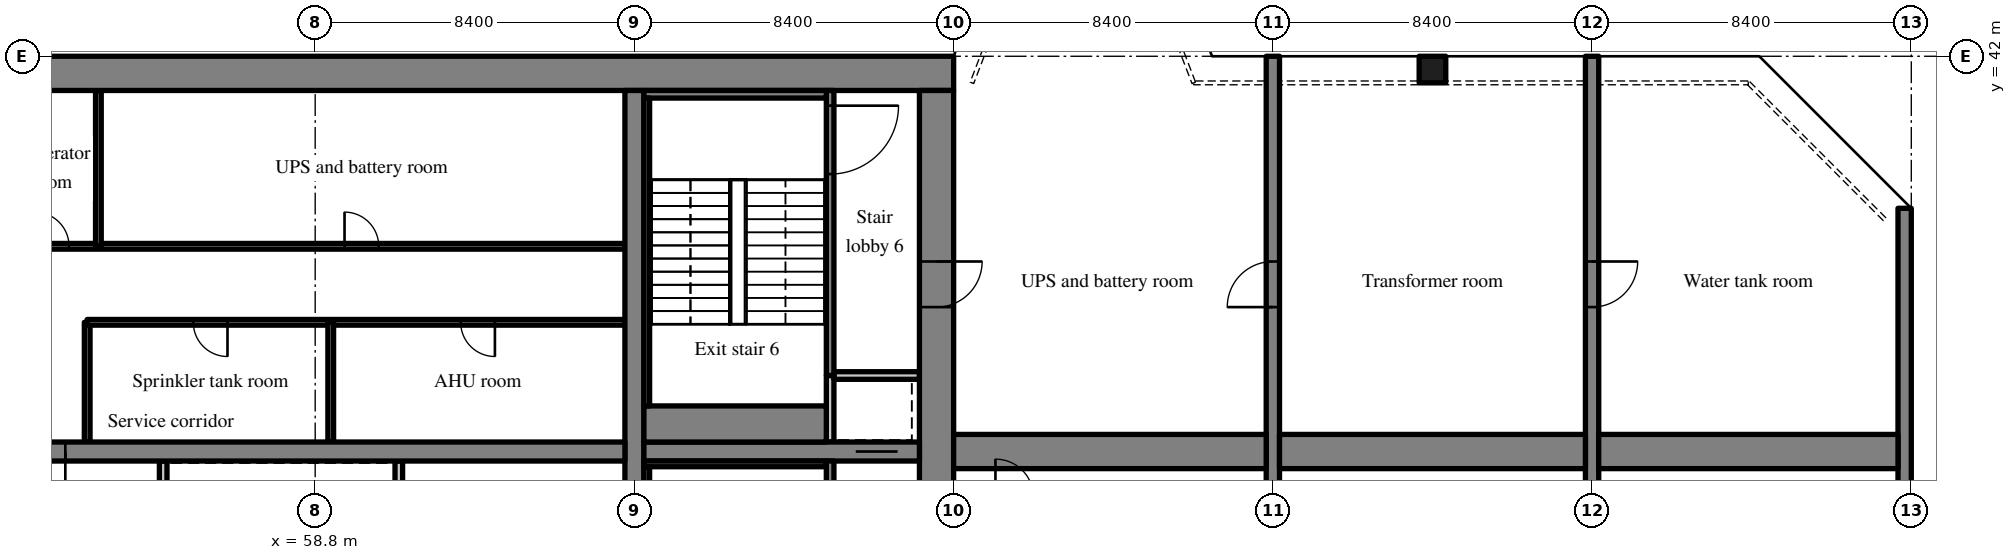
"""IFC4 building model, lengths in metres.
Left out: names, types, materials, properties, quantities, classifications, styles, units other than length and angle.
Written with IfcOpenShell. Run it as: python <this file> out.ifc"""

import sys

from ifc_helpers import new_model, si_unit, direction, frame, frame_2d, origin, origin_2d, place, context, subcontext, project, spatial, rectangle, extrude, source, transform, mapped, element, fill, save


model = new_model("IFC4")
c1 = context("Model", 3, precision=1e-05, world=origin(), true_north=direction((0.0, 1.0)))
c2 = subcontext(c1, "Body", "Model", "MODEL_VIEW")
j1 = project(units=[si_unit("LENGTHUNIT", "METRE"), si_unit("PLANEANGLEUNIT", "RADIAN")], contexts=[c1])
p1 = place(None, origin())
s1 = spatial("IfcSite", under=j1, at=p1, CompositionType="ELEMENT")
p2 = place(p1, origin())
s2 = spatial("IfcBuilding", under=s1, at=p2, CompositionType="ELEMENT")
p3 = place(p2, frame((0.0, 0.0, 140.8)))
s3 = spatial("IfcBuildingStorey", under=s2, at=p3, CompositionType="ELEMENT", Elevation=140.8)
m1 = source(origin(), c2, "Body", "SweptSolid", [
    extrude(rectangle(XDim=50.4, YDim=0.9, at=frame_2d((25.2, 0.0))), origin(), (0.0, 0.0, 1.0), 5.12),
])
p4 = place(p3, frame((25.2, 41.55, 0.0), z_axis=(0.0, 0.0, 1.0), x_axis=(1.0, 0.0, 0.0)))
e1 = element("IfcWall", 1, at=p4, inside=s3, PredefinedType="SHEAR", context=c2, shape_type="MappedRepresentation", body=[
    mapped(m1, transform((0.0, 0.0, 0.0), scale=1.0)),
])
m2 = source(origin(), c2, "Body", "SweptSolid", [
    extrude(rectangle(XDim=18.2, YDim=0.9, at=frame_2d((9.1, 0.0))), origin(), (0.0, 0.0, 1.0), 5.12),
])
p5 = place(p3, frame((75.15, 22.9, 0.0), z_axis=(0.0, 0.0, 1.0), x_axis=(0.0, 1.0, 0.0)))
e2 = element("IfcWall", 2, at=p5, inside=s3, PredefinedType="SHEAR", context=c2, shape_type="MappedRepresentation", body=[
    mapped(m2, transform((0.0, 0.0, 0.0), scale=1.0)),
])
m3 = source(origin(), c2, "Body", "SweptSolid", [
    extrude(rectangle(XDim=1.0, YDim=2.1, at=frame_2d((0.5, 1.05))), frame((0.0, 0.46, 0.0), z_axis=(0.0, -1.0, 0.0), x_axis=(1.0, 0.0, 0.0)), (0.0, 0.0, 1.0), 0.92),
])
p6 = place(p5, frame((2.6, 0.0, 0.0)))
e3 = element("IfcOpeningElement", 3, at=p6, cuts=e2, PredefinedType="OPENING", context=c2, shape_type="MappedRepresentation", body=[
    mapped(m3, transform((0.0, 0.0, 0.0), scale=1.0)),
])
m4 = source(origin(), c2, "Body", "SweptSolid", [
    extrude(rectangle(XDim=1.2, YDim=2.1, at=frame_2d((0.6, 1.05))), frame((0.0, 0.46, 0.0), z_axis=(0.0, -1.0, 0.0), x_axis=(1.0, 0.0, 0.0)), (0.0, 0.0, 1.0), 0.92),
])
p7 = place(p5, frame((12.5, 0.0, 0.0)))
e4 = element("IfcOpeningElement", 4, at=p7, cuts=e2, PredefinedType="OPENING", context=c2, shape_type="MappedRepresentation", body=[
    mapped(m4, transform((0.0, 0.0, 0.0), scale=1.0)),
])
m5 = source(origin(), c2, "Body", "SweptSolid", [
    extrude(rectangle(XDim=18.2, YDim=0.5, at=frame_2d((9.1, 0.0))), origin(), (0.0, 0.0, 1.0), 5.12),
])
p8 = place(p3, frame((67.2, 22.9, 0.0), z_axis=(0.0, 0.0, 1.0), x_axis=(0.0, 1.0, 0.0)))
e5 = element("IfcWall", 5, at=p8, inside=s3, PredefinedType="SHEAR", context=c2, shape_type="MappedRepresentation", body=[
    mapped(m5, transform((0.0, 0.0, 0.0), scale=1.0)),
])
m6 = source(origin(), c2, "Body", "SweptSolid", [
    extrude(rectangle(XDim=16.3, YDim=0.5, at=frame_2d((8.15, 0.0))), origin(), (0.0, 0.0, 1.0), 5.12),
])
p9 = place(p3, frame((50.65, 31.6, 0.0), z_axis=(0.0, 0.0, 1.0), x_axis=(1.0, 0.0, 0.0)))
e6 = element("IfcWall", 6, at=p9, inside=s3, PredefinedType="SHEAR", context=c2, shape_type="MappedRepresentation", body=[
    mapped(m6, transform((0.0, 0.0, 0.0), scale=1.0)),
])
m7 = source(origin(), c2, "Body", "SweptSolid", [
    extrude(rectangle(XDim=1.0, YDim=2.1, at=frame_2d((0.5, 1.05))), frame((0.0, 0.26, 0.0), z_axis=(0.0, -1.0, 0.0), x_axis=(1.0, 0.0, 0.0)), (0.0, 0.0, 1.0), 0.52),
])
p10 = place(p9, frame((0.575, 0.0, 0.0)))
e7 = element("IfcOpeningElement", 7, at=p10, cuts=e6, PredefinedType="OPENING", context=c2, shape_type="MappedRepresentation", body=[
    mapped(m7, transform((0.0, 0.0, 0.0), scale=1.0)),
])
m8 = source(origin(), c2, "Body", "SweptSolid", [
    extrude(rectangle(XDim=7.25, YDim=0.5, at=frame_2d((3.625, 0.0))), origin(), (0.0, 0.0, 1.0), 5.12),
])
p11 = place(p3, frame((67.45, 31.6, 0.0), z_axis=(0.0, 0.0, 1.0), x_axis=(1.0, 0.0, 0.0)))
e8 = element("IfcWall", 8, at=p11, inside=s3, PredefinedType="SHEAR", context=c2, shape_type="MappedRepresentation", body=[
    mapped(m8, transform((0.0, 0.0, 0.0), scale=1.0)),
])
m9 = source(origin(), c2, "Body", "SweptSolid", [
    extrude(rectangle(XDim=1.1, YDim=2.1, at=frame_2d((0.55, 1.05))), frame((0.0, 0.26, 0.0), z_axis=(0.0, -1.0, 0.0), x_axis=(1.0, 0.0, 0.0)), (0.0, 0.0, 1.0), 0.52),
])
p12 = place(p11, frame((5.575, 0.0, 0.0)))
e9 = element("IfcOpeningElement", 9, at=p12, cuts=e8, PredefinedType="OPENING", context=c2, shape_type="MappedRepresentation", body=[
    mapped(m9, transform((0.0, 0.0, 0.0), scale=1.0)),
])
m10 = source(origin(), c2, "Body", "SweptSolid", [
    extrude(rectangle(XDim=20.0, YDim=0.35, at=frame_2d((10.0, 0.0))), origin(), (0.0, 0.0, 1.0), 5.12),
])
p13 = place(p3, frame((84.0, 22.0, 0.0), z_axis=(0.0, 0.0, 1.0), x_axis=(0.0, 1.0, 0.0)))
e10 = element("IfcWall", 10, at=p13, inside=s3, PredefinedType="SHEAR", context=c2, shape_type="MappedRepresentation", body=[
    mapped(m10, transform((0.0, 0.0, 0.0), scale=1.0)),
])
m11 = source(origin(), c2, "Body", "SweptSolid", [
    extrude(rectangle(XDim=1.2, YDim=2.1, at=frame_2d((0.6, 1.05))), frame((0.0, 0.185, 0.0), z_axis=(0.0, -1.0, 0.0), x_axis=(1.0, 0.0, 0.0)), (0.0, 0.0, 1.0), 0.37),
])
p14 = place(p13, frame((13.4, 0.0, 0.0)))
e11 = element("IfcOpeningElement", 11, at=p14, cuts=e10, PredefinedType="OPENING", context=c2, shape_type="MappedRepresentation", body=[
    mapped(m11, transform((0.0, 0.0, 0.0), scale=1.0)),
])
p15 = place(p3, frame((92.4, 22.0, 0.0), z_axis=(0.0, 0.0, 1.0), x_axis=(0.0, 1.0, 0.0)))
e12 = element("IfcWall", 12, at=p15, inside=s3, PredefinedType="SHEAR", context=c2, shape_type="MappedRepresentation", body=[
    mapped(m10, transform((0.0, 0.0, 0.0), scale=1.0)),
])
p16 = place(p15, frame((13.4, 0.0, 0.0)))
e13 = element("IfcOpeningElement", 13, at=p16, cuts=e12, PredefinedType="OPENING", context=c2, shape_type="MappedRepresentation", body=[
    mapped(m11, transform((0.0, 0.0, 0.0), scale=1.0)),
])
m12 = source(origin(), c2, "Body", "SweptSolid", [
    extrude(rectangle(XDim=16.0, YDim=0.35, at=frame_2d((8.0, 0.0))), origin(), (0.0, 0.0, 1.0), 5.12),
])
p17 = place(p3, frame((100.625, 22.0, 0.0), z_axis=(0.0, 0.0, 1.0), x_axis=(0.0, 1.0, 0.0)))
e14 = element("IfcWall", 14, at=p17, inside=s3, PredefinedType="SHEAR", context=c2, shape_type="MappedRepresentation", body=[
    mapped(m12, transform((0.0, 0.0, 0.0), scale=1.0)),
])
m13 = source(origin(), c2, "Body", "SweptSolid", [
    extrude(rectangle(XDim=0.7, YDim=0.7, at=origin_2d()), origin(), (0.0, 0.0, 1.0), 5.12),
])
p18 = place(p3, frame((88.2, 41.65, 0.0), z_axis=(0.0, 0.0, 1.0), x_axis=(1.0, 0.0, 0.0)))
e15 = element("IfcColumn", 15, at=p18, inside=s3, PredefinedType="COLUMN", context=c2, shape_type="MappedRepresentation", body=[
    mapped(m13, transform((0.0, 0.0, 0.0), scale=1.0)),
])
m14 = source(origin(), c2, "Body", "SweptSolid", [
    extrude(rectangle(XDim=8.225, YDim=0.9, at=frame_2d((4.112, 0.0))), origin(), (0.0, 0.0, 1.0), 5.12),
])
p19 = place(p3, frame((75.6, 31.6, 0.0), z_axis=(0.0, 0.0, 1.0), x_axis=(1.0, 0.0, 0.0)))
e16 = element("IfcWall", 16, at=p19, inside=s3, PredefinedType="SHEAR", context=c2, shape_type="MappedRepresentation", body=[
    mapped(m14, transform((0.0, 0.0, 0.0), scale=1.0)),
])
m15 = source(origin(), c2, "Body", "SweptSolid", [
    extrude(rectangle(XDim=8.05, YDim=0.9, at=frame_2d((4.025, 0.0))), origin(), (0.0, 0.0, 1.0), 5.12),
])
p20 = place(p3, frame((84.175, 31.6, 0.0), z_axis=(0.0, 0.0, 1.0), x_axis=(1.0, 0.0, 0.0)))
e17 = element("IfcWall", 17, at=p20, inside=s3, PredefinedType="SHEAR", context=c2, shape_type="MappedRepresentation", body=[
    mapped(m15, transform((0.0, 0.0, 0.0), scale=1.0)),
])
m16 = source(origin(), c2, "Body", "SweptSolid", [
    extrude(rectangle(XDim=7.875, YDim=0.9, at=frame_2d((3.938, 0.0))), origin(), (0.0, 0.0, 1.0), 5.12),
])
p21 = place(p3, frame((92.575, 31.6, 0.0), z_axis=(0.0, 0.0, 1.0), x_axis=(1.0, 0.0, 0.0)))
e18 = element("IfcWall", 18, at=p21, inside=s3, PredefinedType="SHEAR", context=c2, shape_type="MappedRepresentation", body=[
    mapped(m16, transform((0.0, 0.0, 0.0), scale=1.0)),
])
m17 = source(origin(), c2, "Body", "SweptSolid", [
    extrude(rectangle(XDim=2.55, YDim=0.2, at=frame_2d((1.275, 0.0))), origin(), (0.0, 0.0, 1.0), 5.12),
])
for number, where, z_axis, x_axis in (
    (19, (54.8, 28.8, 0.0), (0.0, 0.0, 1.0), (0.0, 1.0, 0.0)),
    (20, (61.0, 28.8, 0.0), (0.0, 0.0, 1.0), (0.0, 1.0, 0.0)),
):
    element("IfcWall", number, at=place(p3, frame(where, z_axis=z_axis, x_axis=x_axis)), inside=s3, PredefinedType="SOLIDWALL", context=c2, shape_type="MappedRepresentation", body=[
        mapped(m17, transform((0.0, 0.0, 0.0), scale=1.0)),
    ])
m18 = source(origin(), c2, "Body", "SweptSolid", [
    extrude(rectangle(XDim=3.15, YDim=0.15, at=frame_2d((1.575, 0.0))), origin(), (0.0, 0.0, 1.0), 5.12),
])
p22 = place(p3, frame((52.8, 31.85, 0.0), z_axis=(0.0, 0.0, 1.0), x_axis=(0.0, 1.0, 0.0)))
e21 = element("IfcWall", 21, at=p22, inside=s3, PredefinedType="PARTITIONING", context=c2, shape_type="MappedRepresentation", body=[
    mapped(m18, transform((0.0, 0.0, 0.0), scale=1.0)),
])
m19 = source(origin(), c2, "Body", "SweptSolid", [
    extrude(rectangle(XDim=14.15, YDim=0.15, at=frame_2d((7.075, 0.0))), origin(), (0.0, 0.0, 1.0), 5.12),
])
p23 = place(p3, frame((66.95, 35.0, 0.0), z_axis=(0.0, 0.0, 1.0), x_axis=(-1.0, 0.0, 0.0)))
e22 = element("IfcWall", 22, at=p23, inside=s3, PredefinedType="PARTITIONING", context=c2, shape_type="MappedRepresentation", body=[
    mapped(m19, transform((0.0, 0.0, 0.0), scale=1.0)),
])
m20 = source(origin(), c2, "Body", "SweptSolid", [
    extrude(rectangle(XDim=0.9, YDim=2.1, at=frame_2d((0.45, 1.05))), frame((0.0, 0.085, 0.0), z_axis=(0.0, -1.0, 0.0), x_axis=(1.0, 0.0, 0.0)), (0.0, 0.0, 1.0), 0.17),
])
p24 = place(p23, frame((3.421, 0.0, 0.0)))
e23 = element("IfcOpeningElement", 23, at=p24, cuts=e22, PredefinedType="OPENING", context=c2, shape_type="MappedRepresentation", body=[
    mapped(m20, transform((0.0, 0.0, 0.0), scale=1.0)),
])
p25 = place(p23, frame((10.458, 0.0, 0.0)))
e24 = element("IfcOpeningElement", 24, at=p25, cuts=e22, PredefinedType="OPENING", context=c2, shape_type="MappedRepresentation", body=[
    mapped(m20, transform((0.0, 0.0, 0.0), scale=1.0)),
])
m21 = source(origin(), c2, "Body", "SweptSolid", [
    extrude(rectangle(XDim=16.3, YDim=0.15, at=frame_2d((8.15, 0.0))), origin(), (0.0, 0.0, 1.0), 5.12),
])
p26 = place(p3, frame((66.95, 37.0, 0.0), z_axis=(0.0, 0.0, 1.0), x_axis=(-1.0, 0.0, 0.0)))
e25 = element("IfcWall", 25, at=p26, inside=s3, PredefinedType="PARTITIONING", context=c2, shape_type="MappedRepresentation", body=[
    mapped(m21, transform((0.0, 0.0, 0.0), scale=1.0)),
])
p27 = place(p26, frame((6.478, 0.0, 0.0)))
e26 = element("IfcOpeningElement", 26, at=p27, cuts=e25, PredefinedType="OPENING", context=c2, shape_type="MappedRepresentation", body=[
    mapped(m20, transform((0.0, 0.0, 0.0), scale=1.0)),
])
p28 = place(p26, frame((14.627, 0.0, 0.0)))
e27 = element("IfcOpeningElement", 27, at=p28, cuts=e25, PredefinedType="OPENING", context=c2, shape_type="MappedRepresentation", body=[
    mapped(m20, transform((0.0, 0.0, 0.0), scale=1.0)),
])
p29 = place(p3, frame((59.209, 31.85, 0.0), z_axis=(0.0, 0.0, 1.0), x_axis=(0.0, 1.0, 0.0)))
e28 = element("IfcWall", 28, at=p29, inside=s3, PredefinedType="PARTITIONING", context=c2, shape_type="MappedRepresentation", body=[
    mapped(m18, transform((0.0, 0.0, 0.0), scale=1.0)),
])
m22 = source(origin(), c2, "Body", "SweptSolid", [
    extrude(rectangle(XDim=4.1, YDim=0.15, at=frame_2d((2.05, 0.0))), origin(), (0.0, 0.0, 1.0), 5.12),
])
p30 = place(p3, frame((53.095, 37.0, 0.0), z_axis=(0.0, 0.0, 1.0), x_axis=(0.0, 1.0, 0.0)))
e29 = element("IfcWall", 29, at=p30, inside=s3, PredefinedType="PARTITIONING", context=c2, shape_type="MappedRepresentation", body=[
    mapped(m22, transform((0.0, 0.0, 0.0), scale=1.0)),
])
m23 = source(origin(), c2, "Body", "SweptSolid", [
    extrude(rectangle(XDim=8.45, YDim=0.2, at=frame_2d((4.225, 0.0))), origin(), (0.0, 0.0, 1.0), 5.12),
])
p31 = place(p3, frame((72.35, 22.9, 0.0), z_axis=(0.0, 0.0, 1.0), x_axis=(0.0, 1.0, 0.0)))
e30 = element("IfcWall", 30, at=p31, inside=s3, PredefinedType="SOLIDWALL", context=c2, shape_type="MappedRepresentation", body=[
    mapped(m23, transform((0.0, 0.0, 0.0), scale=1.0)),
])
m24 = source(origin(), c2, "Body", "SweptSolid", [
    extrude(rectangle(XDim=1.2, YDim=2.1, at=frame_2d((0.6, 1.05))), frame((0.0, 0.11, 0.0), z_axis=(0.0, -1.0, 0.0), x_axis=(1.0, 0.0, 0.0)), (0.0, 0.0, 1.0), 0.22),
])
p32 = place(p31, frame((6.6, 0.0, 0.0)))
e31 = element("IfcOpeningElement", 31, at=p32, cuts=e30, PredefinedType="OPENING", context=c2, shape_type="MappedRepresentation", body=[
    mapped(m24, transform((0.0, 0.0, 0.0), scale=1.0)),
])
m25 = source(origin(), c2, "Body", "SweptSolid", [
    extrude(rectangle(XDim=1.75, YDim=0.2, at=frame_2d((0.875, 0.0))), origin(), (0.0, 0.0, 1.0), 5.12),
])
p33 = place(p3, frame((72.35, 31.85, 0.0), z_axis=(0.0, 0.0, 1.0), x_axis=(0.0, 1.0, 0.0)))
e32 = element("IfcWall", 32, at=p33, inside=s3, PredefinedType="SOLIDWALL", context=c2, shape_type="MappedRepresentation", body=[
    mapped(m25, transform((0.0, 0.0, 0.0), scale=1.0)),
])
m26 = source(origin(), c2, "Body", "SweptSolid", [
    extrude(rectangle(XDim=2.25, YDim=0.2, at=frame_2d((1.125, 0.0))), origin(), (0.0, 0.0, 1.0), 5.12),
])
p34 = place(p3, frame((72.45, 33.6, 0.0), z_axis=(0.0, 0.0, 1.0), x_axis=(1.0, 0.0, 0.0)))
e33 = element("IfcWall", 33, at=p34, inside=s3, PredefinedType="SOLIDWALL", context=c2, shape_type="MappedRepresentation", body=[
    mapped(m26, transform((0.0, 0.0, 0.0), scale=1.0)),
])
m27 = source(origin(), c2, "Body", "SweptSolid", [
    extrude(rectangle(XDim=7.5, YDim=0.2, at=frame_2d((3.75, 0.0))), origin(), (0.0, 0.0, 1.0), 5.12),
])
p35 = place(p3, frame((72.35, 33.6, 0.0), z_axis=(0.0, 0.0, 1.0), x_axis=(0.0, 1.0, 0.0)))
e34 = element("IfcWall", 34, at=p35, inside=s3, PredefinedType="SOLIDWALL", context=c2, shape_type="MappedRepresentation", body=[
    mapped(m27, transform((0.0, 0.0, 0.0), scale=1.0)),
])
m28 = source(origin(), c2, "Body", "SweptSolid", [
    extrude(rectangle(XDim=1.8, YDim=2.1, at=frame_2d((0.9, 1.05))), frame((0.0, 0.11, 0.0), z_axis=(0.0, -1.0, 0.0), x_axis=(1.0, 0.0, 0.0)), (0.0, 0.0, 1.0), 0.22),
])
p36 = place(p35, frame((5.3, 0.0, 0.0)))
e35 = element("IfcOpeningElement", 35, at=p36, cuts=e34, PredefinedType="OPENING", context=c2, shape_type="MappedRepresentation", body=[
    mapped(m28, transform((0.0, 0.0, 0.0), scale=1.0)),
])
m29 = source(origin(), c2, "Body", "SweptSolid", [
    extrude(rectangle(XDim=4.8, YDim=0.15, at=frame_2d((2.4, 0.0))), origin(), (0.0, 0.0, 1.0), 5.12),
])
p37 = place(p3, frame((67.45, 31.275, 0.0), z_axis=(0.0, 0.0, 1.0), x_axis=(1.0, 0.0, 0.0)))
e36 = element("IfcWall", 36, at=p37, inside=s3, PredefinedType="SOLIDWALL", context=c2, shape_type="MappedRepresentation", body=[
    mapped(m29, transform((0.0, 0.0, 0.0), scale=1.0)),
])
m30 = source(origin(), c2, "Body", "SweptSolid", [
    extrude(rectangle(XDim=8.1, YDim=0.15, at=frame_2d((4.05, 0.0))), origin(), (0.0, 0.0, 1.0), 5.12),
])
p38 = place(p3, frame((67.525, 23.1, 0.0), z_axis=(0.0, 0.0, 1.0), x_axis=(0.0, 1.0, 0.0)))
e37 = element("IfcWall", 37, at=p38, inside=s3, PredefinedType="SOLIDWALL", context=c2, shape_type="MappedRepresentation", body=[
    mapped(m30, transform((0.0, 0.0, 0.0), scale=1.0)),
])
m31 = source(origin(), c2, "Body", "SweptSolid", [
    extrude(rectangle(XDim=4.8, YDim=0.2, at=frame_2d((2.4, 0.0))), origin(), (0.0, 0.0, 1.0), 5.12),
])
p39 = place(p3, frame((67.45, 41.0, 0.0), z_axis=(0.0, 0.0, 1.0), x_axis=(1.0, 0.0, 0.0)))
e38 = element("IfcWall", 38, at=p39, inside=s3, PredefinedType="SOLIDWALL", context=c2, shape_type="MappedRepresentation", body=[
    mapped(m31, transform((0.0, 0.0, 0.0), scale=1.0)),
])
m32 = source(origin(), c2, "Body", "SweptSolid", [
    extrude(rectangle(XDim=4.8, YDim=0.95, at=frame_2d((2.4, 0.0))), origin(), (0.0, 0.0, 1.0), 5.12),
])
p40 = place(p3, frame((67.45, 32.325, 0.0), z_axis=(0.0, 0.0, 1.0), x_axis=(1.0, 0.0, 0.0)))
e39 = element("IfcWall", 39, at=p40, inside=s3, PredefinedType="SOLIDWALL", context=c2, shape_type="MappedRepresentation", body=[
    mapped(m32, transform((0.0, 0.0, 0.0), scale=1.0)),
])
p41 = place(p3, frame((67.525, 32.8, 0.0), z_axis=(0.0, 0.0, 1.0), x_axis=(0.0, 1.0, 0.0)))
e40 = element("IfcWall", 40, at=p41, inside=s3, PredefinedType="SOLIDWALL", context=c2, shape_type="MappedRepresentation", body=[
    mapped(m30, transform((0.0, 0.0, 0.0), scale=1.0)),
])
m33 = source(origin(), c2, "Body", "SweptSolid", [
    extrude(rectangle(XDim=1.0, YDim=2.1, at=frame_2d((0.5, 1.05))), frame((0.0, 0.025, 0.0), z_axis=(0.0, -1.0, 0.0), x_axis=(1.0, 0.0, 0.0)), (0.0, 0.0, 1.0), 0.05),
])
p42 = place(p10, origin())
e41 = element("IfcDoor", 41, at=p42, inside=s3, OperationType="SINGLE_SWING_RIGHT", PredefinedType="DOOR", context=c2, shape_type="MappedRepresentation", body=[
    mapped(m33, transform((0.0, 0.0, 0.0), scale=1.0)),
])
fill(e7, e41)
m34 = source(origin(), c2, "Body", "SweptSolid", [
    extrude(rectangle(XDim=0.9, YDim=2.1, at=frame_2d((0.45, 1.05))), frame((0.0, 0.025, 0.0), z_axis=(0.0, -1.0, 0.0), x_axis=(1.0, 0.0, 0.0)), (0.0, 0.0, 1.0), 0.05),
])
p43 = place(p24, origin())
e42 = element("IfcDoor", 42, at=p43, inside=s3, OperationType="SINGLE_SWING_LEFT", PredefinedType="DOOR", context=c2, shape_type="MappedRepresentation", body=[
    mapped(m34, transform((0.0, 0.0, 0.0), scale=1.0)),
])
fill(e23, e42)
p44 = place(p25, origin())
e43 = element("IfcDoor", 43, at=p44, inside=s3, OperationType="SINGLE_SWING_LEFT", PredefinedType="DOOR", context=c2, shape_type="MappedRepresentation", body=[
    mapped(m34, transform((0.0, 0.0, 0.0), scale=1.0)),
])
fill(e24, e43)
p45 = place(p27, origin())
e44 = element("IfcDoor", 44, at=p45, inside=s3, OperationType="SINGLE_SWING_RIGHT", PredefinedType="DOOR", context=c2, shape_type="MappedRepresentation", body=[
    mapped(m34, transform((0.0, 0.0, 0.0), scale=1.0)),
])
fill(e26, e44)
p46 = place(p28, origin())
e45 = element("IfcDoor", 45, at=p46, inside=s3, OperationType="SINGLE_SWING_RIGHT", PredefinedType="DOOR", context=c2, shape_type="MappedRepresentation", body=[
    mapped(m34, transform((0.0, 0.0, 0.0), scale=1.0)),
])
fill(e27, e45)
m35 = source(origin(), c2, "Body", "SweptSolid", [
    extrude(rectangle(XDim=1.1, YDim=2.1, at=frame_2d((0.55, 1.05))), frame((0.0, 0.025, 0.0), z_axis=(0.0, -1.0, 0.0), x_axis=(1.0, 0.0, 0.0)), (0.0, 0.0, 1.0), 0.05),
])
p47 = place(p12, origin())
e46 = element("IfcDoor", 46, at=p47, inside=s3, OperationType="SLIDING_TO_RIGHT", PredefinedType="DOOR", context=c2, shape_type="MappedRepresentation", body=[
    mapped(m35, transform((0.0, 0.0, 0.0), scale=1.0)),
])
fill(e9, e46)
m36 = source(origin(), c2, "Body", "SweptSolid", [
    extrude(rectangle(XDim=1.8, YDim=2.1, at=frame_2d((0.9, 1.05))), frame((0.0, 0.025, 0.0), z_axis=(0.0, -1.0, 0.0), x_axis=(1.0, 0.0, 0.0)), (0.0, 0.0, 1.0), 0.05),
])
p48 = place(p36, origin())
e47 = element("IfcDoor", 47, at=p48, inside=s3, OperationType="SINGLE_SWING_RIGHT", PredefinedType="DOOR", context=c2, shape_type="MappedRepresentation", body=[
    mapped(m36, transform((0.0, 0.0, 0.0), scale=1.0)),
])
fill(e35, e47)
m37 = source(origin(), c2, "Body", "SweptSolid", [
    extrude(rectangle(XDim=1.2, YDim=2.1, at=frame_2d((0.6, 1.05))), frame((0.0, 0.025, 0.0), z_axis=(0.0, -1.0, 0.0), x_axis=(1.0, 0.0, 0.0)), (0.0, 0.0, 1.0), 0.05),
])
p49 = place(p7, origin())
e48 = element("IfcDoor", 48, at=p49, inside=s3, OperationType="SINGLE_SWING_RIGHT", PredefinedType="DOOR", context=c2, shape_type="MappedRepresentation", body=[
    mapped(m37, transform((0.0, 0.0, 0.0), scale=1.0)),
])
fill(e4, e48)
p50 = place(p14, origin())
e49 = element("IfcDoor", 49, at=p50, inside=s3, OperationType="SINGLE_SWING_LEFT", PredefinedType="DOOR", context=c2, shape_type="MappedRepresentation", body=[
    mapped(m37, transform((0.0, 0.0, 0.0), scale=1.0)),
])
fill(e11, e49)
p51 = place(p16, origin())
e50 = element("IfcDoor", 50, at=p51, inside=s3, OperationType="SINGLE_SWING_RIGHT", PredefinedType="DOOR", context=c2, shape_type="MappedRepresentation", body=[
    mapped(m37, transform((0.0, 0.0, 0.0), scale=1.0)),
])
fill(e13, e50)
save(model, sys.argv[1])
